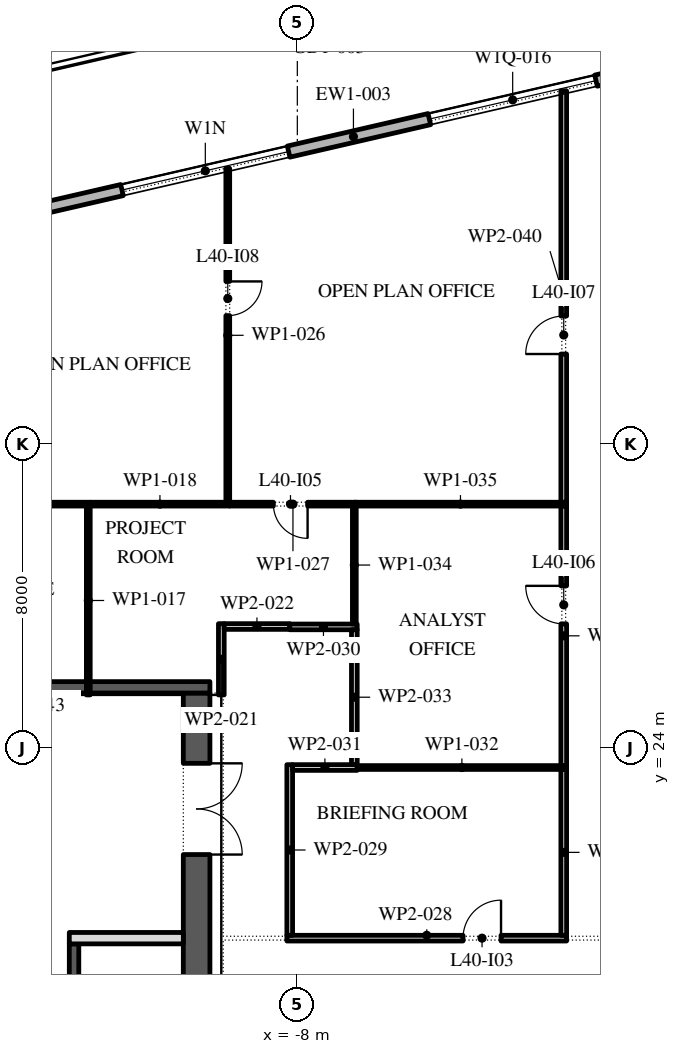
"""IFC4 building model, lengths in metres.
Left out: names, types, materials, properties, quantities, classifications, styles, units other than length and angle.
Written with IfcOpenShell. Run it as: python <this file> out.ifc"""

import sys

from ifc_helpers import new_model, si_unit, direction, frame, frame_2d, origin, place, context, subcontext, project, spatial, rectangle, extrude, element, fill, save


model = new_model("IFC4")
c1 = context("Model", 3, precision=1e-05, world=origin(), true_north=direction((0.0, 1.0)))
c2 = subcontext(c1, "Body", "Model", "MODEL_VIEW")
j1 = project(units=[si_unit("LENGTHUNIT", "METRE"), si_unit("PLANEANGLEUNIT", "RADIAN")], contexts=[c1])
p1 = place(None, origin())
s1 = spatial("IfcSite", under=j1, at=p1, CompositionType="ELEMENT")
p2 = place(p1, origin())
s2 = spatial("IfcBuilding", under=s1, at=p2, CompositionType="ELEMENT")
p3 = place(p2, frame((0.0, 0.0, 184.2)))
s3 = spatial("IfcBuildingStorey", under=s2, at=p3, CompositionType="ELEMENT", Elevation=184.2)
p4 = place(p3, frame((17.592, 45.657, 0.0), z_axis=(0.0, 0.0, 1.0), x_axis=(-0.974370243697, -0.224950279389, 0.0)))
e1 = element("IfcWall", 1, at=p4, inside=s3, PredefinedType="STANDARD", context=c2, shape_type="SweptSolid", body=[
    extrude(rectangle(XDim=49.5, YDim=0.3, at=frame_2d((24.75, 0.0))), origin(), (0.0, 0.0, 1.0), 4.0),
])
p5 = place(p4, frame((2.8, 0.0, 0.0)))
e2 = element("IfcOpeningElement", 2, at=p5, cuts=e1, PredefinedType="OPENING", context=c2, shape_type="SweptSolid", body=[
    extrude(rectangle(XDim=2.4, YDim=3.5, at=frame_2d((1.2, 1.75))), frame((0.0, 0.16, 0.0), z_axis=(0.0, -1.0, 0.0), x_axis=(1.0, 0.0, 0.0)), (0.0, 0.0, 1.0), 0.32),
])
p6 = place(p4, frame((9.9, 0.0, 0.45)))
e3 = element("IfcOpeningElement", 3, at=p6, cuts=e1, PredefinedType="OPENING", context=c2, shape_type="SweptSolid", body=[
    extrude(rectangle(XDim=4.5, YDim=2.45, at=frame_2d((2.25, 1.225))), frame((0.0, 0.16, 0.0), z_axis=(0.0, -1.0, 0.0), x_axis=(1.0, 0.0, 0.0)), (0.0, 0.0, 1.0), 0.32),
])
p7 = place(p4, frame((18.2, 0.0, 0.45)))
e4 = element("IfcOpeningElement", 4, at=p7, cuts=e1, PredefinedType="OPENING", context=c2, shape_type="SweptSolid", body=[
    extrude(rectangle(XDim=4.5, YDim=2.45, at=frame_2d((2.25, 1.225))), frame((0.0, 0.16, 0.0), z_axis=(0.0, -1.0, 0.0), x_axis=(1.0, 0.0, 0.0)), (0.0, 0.0, 1.0), 0.32),
])
p8 = place(p4, frame((26.5, 0.0, 0.45)))
e5 = element("IfcOpeningElement", 5, at=p8, cuts=e1, PredefinedType="OPENING", context=c2, shape_type="SweptSolid", body=[
    extrude(rectangle(XDim=4.5, YDim=2.525, at=frame_2d((2.25, 1.262))), frame((0.0, 0.16, 0.0), z_axis=(0.0, -1.0, 0.0), x_axis=(1.0, 0.0, 0.0)), (0.0, 0.0, 1.0), 0.32),
])
p9 = place(p4, frame((35.85, 0.0, 0.0)))
e6 = element("IfcOpeningElement", 6, at=p9, cuts=e1, PredefinedType="OPENING", context=c2, shape_type="SweptSolid", body=[
    extrude(rectangle(XDim=2.4, YDim=3.5, at=frame_2d((1.2, 1.75))), frame((0.0, 0.16, 0.0), z_axis=(0.0, -1.0, 0.0), x_axis=(1.0, 0.0, 0.0)), (0.0, 0.0, 1.0), 0.32),
])
p10 = place(p4, frame((43.1, 0.0, 0.45)))
e7 = element("IfcOpeningElement", 7, at=p10, cuts=e1, PredefinedType="OPENING", context=c2, shape_type="SweptSolid", body=[
    extrude(rectangle(XDim=4.5, YDim=2.675, at=frame_2d((2.25, 1.337))), frame((0.0, 0.16, 0.0), z_axis=(0.0, -1.0, 0.0), x_axis=(1.0, 0.0, 0.0)), (0.0, 0.0, 1.0), 0.32),
])
p11 = place(p3, frame((-10.65, -2.45, 0.0), z_axis=(0.0, 0.0, 1.0), x_axis=(0.0, 1.0, 0.0)))
e8 = element("IfcWall", 8, at=p11, inside=s3, PredefinedType="SHEAR", context=c2, shape_type="SweptSolid", body=[
    extrude(rectangle(XDim=27.9, YDim=0.7, at=frame_2d((13.95, 0.0))), origin(), (0.0, 0.0, 1.0), 4.0),
])
p12 = place(p11, frame((23.65, 0.0, 0.0)))
e9 = element("IfcOpeningElement", 9, at=p12, cuts=e8, PredefinedType="OPENING", context=c2, shape_type="SweptSolid", body=[
    extrude(rectangle(XDim=2.4, YDim=2.1, at=frame_2d((1.2, 1.05))), frame((0.0, 0.36, 0.0), z_axis=(0.0, -1.0, 0.0), x_axis=(1.0, 0.0, 0.0)), (0.0, 0.0, 1.0), 0.72),
])
p13 = place(p11, frame((0.788, 0.0, 0.0)))
e10 = element("IfcOpeningElement", 10, at=p13, cuts=e8, PredefinedType="OPENING", context=c2, shape_type="SweptSolid", body=[
    extrude(rectangle(XDim=0.9, YDim=2.1, at=frame_2d((0.45, 1.05))), frame((0.0, 0.36, 0.0), z_axis=(0.0, -1.0, 0.0), x_axis=(1.0, 0.0, 0.0)), (0.0, 0.0, 1.0), 0.72),
])
p14 = place(p11, frame((3.962, 0.0, 0.0)))
e11 = element("IfcOpeningElement", 11, at=p14, cuts=e8, PredefinedType="OPENING", context=c2, shape_type="SweptSolid", body=[
    extrude(rectangle(XDim=1.0, YDim=2.1, at=frame_2d((0.5, 1.05))), frame((0.0, 0.36, 0.0), z_axis=(0.0, -1.0, 0.0), x_axis=(1.0, 0.0, 0.0)), (0.0, 0.0, 1.0), 0.72),
])
p15 = place(p3, frame((-21.7, 25.6, 0.0), z_axis=(0.0, 0.0, 1.0), x_axis=(1.0, 0.0, 0.0)))
e12 = element("IfcWall", 12, at=p15, inside=s3, PredefinedType="SHEAR", context=c2, shape_type="SweptSolid", body=[
    extrude(rectangle(XDim=11.4, YDim=0.3, at=frame_2d((5.7, 0.0))), origin(), (0.0, 0.0, 1.0), 4.0),
])
p16 = place(p3, frame((-13.875, -2.45, 0.0), z_axis=(0.0, 0.0, 1.0), x_axis=(0.0, 1.0, 0.0)))
e13 = element("IfcWall", 13, at=p16, inside=s3, PredefinedType="SHEAR", context=c2, shape_type="SweptSolid", body=[
    extrude(rectangle(XDim=21.3, YDim=0.25, at=frame_2d((10.65, 0.0))), origin(), (0.0, 0.0, 1.0), 4.0),
])
p17 = place(p16, frame((17.786, 0.0, 0.0)))
e14 = element("IfcOpeningElement", 14, at=p17, cuts=e13, PredefinedType="OPENING", context=c2, shape_type="SweptSolid", body=[
    extrude(rectangle(XDim=0.9, YDim=2.1, at=frame_2d((0.45, 1.05))), frame((0.0, 0.135, 0.0), z_axis=(0.0, -1.0, 0.0), x_axis=(1.0, 0.0, 0.0)), (0.0, 0.0, 1.0), 0.27),
])
p18 = place(p16, frame((6.971, 0.0, 0.0)))
e15 = element("IfcOpeningElement", 15, at=p18, cuts=e13, PredefinedType="OPENING", context=c2, shape_type="SweptSolid", body=[
    extrude(rectangle(XDim=1.1, YDim=2.1, at=frame_2d((0.55, 1.05))), frame((0.0, 0.135, 0.0), z_axis=(0.0, -1.0, 0.0), x_axis=(1.0, 0.0, 0.0)), (0.0, 0.0, 1.0), 0.27),
])
p19 = place(p16, frame((9.114, 0.0, 0.0)))
e16 = element("IfcOpeningElement", 16, at=p19, cuts=e13, PredefinedType="OPENING", context=c2, shape_type="SweptSolid", body=[
    extrude(rectangle(XDim=1.1, YDim=2.1, at=frame_2d((0.55, 1.05))), frame((0.0, 0.135, 0.0), z_axis=(0.0, -1.0, 0.0), x_axis=(1.0, 0.0, 0.0)), (0.0, 0.0, 1.0), 0.27),
])
p20 = place(p16, frame((11.257, 0.0, 0.0)))
e17 = element("IfcOpeningElement", 17, at=p20, cuts=e13, PredefinedType="OPENING", context=c2, shape_type="SweptSolid", body=[
    extrude(rectangle(XDim=1.1, YDim=2.1, at=frame_2d((0.55, 1.05))), frame((0.0, 0.135, 0.0), z_axis=(0.0, -1.0, 0.0), x_axis=(1.0, 0.0, 0.0)), (0.0, 0.0, 1.0), 0.27),
])
p21 = place(p16, frame((13.4, 0.0, 0.0)))
e18 = element("IfcOpeningElement", 18, at=p21, cuts=e13, PredefinedType="OPENING", context=c2, shape_type="SweptSolid", body=[
    extrude(rectangle(XDim=1.1, YDim=2.1, at=frame_2d((0.55, 1.05))), frame((0.0, 0.135, 0.0), z_axis=(0.0, -1.0, 0.0), x_axis=(1.0, 0.0, 0.0)), (0.0, 0.0, 1.0), 0.27),
])
p22 = place(p3, frame((-14.0, 19.0, 0.0), z_axis=(0.0, 0.0, 1.0), x_axis=(1.0, 0.0, 0.0)))
e19 = element("IfcWall", 19, at=p22, inside=s3, PredefinedType="PARTITIONING", context=c2, shape_type="SweptSolid", body=[
    extrude(rectangle(XDim=3.0, YDim=0.3, at=frame_2d((1.5, 0.0))), origin(), (0.0, 0.0, 1.0), 4.0),
])
p23 = place(p3, frame((-22.47, 30.42, 0.0), z_axis=(0.0, 0.0, 1.0), x_axis=(1.0, 0.0, 0.0)))
e20 = element("IfcWall", 20, at=p23, inside=s3, PredefinedType="PARTITIONING", context=c2, shape_type="SweptSolid", body=[
    extrude(rectangle(XDim=9.02, YDim=0.1, at=frame_2d((4.51, 0.0))), origin(), (0.0, 0.0, 1.0), 4.0),
])
p24 = place(p3, frame((-13.5, 30.37, 0.0), z_axis=(0.0, 0.0, 1.0), x_axis=(0.0, -1.0, 0.0)))
e21 = element("IfcWall", 21, at=p24, inside=s3, PredefinedType="PARTITIONING", context=c2, shape_type="SweptSolid", body=[
    extrude(rectangle(XDim=4.97, YDim=0.1, at=frame_2d((2.485, 0.0))), origin(), (0.0, 0.0, 1.0), 4.0),
])
p25 = place(p3, frame((-13.45, 30.42, 0.0), z_axis=(0.0, 0.0, 1.0), x_axis=(1.0, 0.0, 0.0)))
e22 = element("IfcWall", 22, at=p25, inside=s3, PredefinedType="PARTITIONING", context=c2, shape_type="SweptSolid", body=[
    extrude(rectangle(XDim=3.67, YDim=0.1, at=frame_2d((1.835, 0.0))), origin(), (0.0, 0.0, 1.0), 4.0),
])
p26 = place(p3, frame((-10.0, 25.4, 0.0), z_axis=(0.0, 0.0, 1.0), x_axis=(0.0, 1.0, 0.0)))
e23 = element("IfcWall", 23, at=p26, inside=s3, PredefinedType="PARTITIONING", context=c2, shape_type="SweptSolid", body=[
    extrude(rectangle(XDim=1.875, YDim=0.15, at=frame_2d((0.938, 0.0))), origin(), (0.0, 0.0, 1.0), 4.0),
])
p27 = place(p3, frame((-9.925, 27.2, 0.0), z_axis=(0.0, 0.0, 1.0), x_axis=(1.0, 0.0, 0.0)))
e24 = element("IfcWall", 24, at=p27, inside=s3, PredefinedType="PARTITIONING", context=c2, shape_type="SweptSolid", body=[
    extrude(rectangle(XDim=1.725, YDim=0.15, at=frame_2d((0.863, 0.0))), origin(), (0.0, 0.0, 1.0), 4.0),
])
p28 = place(p3, frame((-9.83, 30.47, 0.0), z_axis=(0.0, 0.0, 1.0), x_axis=(0.0, 1.0, 0.0)))
e25 = element("IfcWall", 25, at=p28, inside=s3, PredefinedType="PARTITIONING", context=c2, shape_type="SweptSolid", body=[
    extrude(rectangle(XDim=8.785, YDim=0.1, at=frame_2d((4.393, 0.0))), origin(), (0.0, 0.0, 1.0), 4.0),
])
p29 = place(p28, frame((4.91, 0.0, 0.0)))
e26 = element("IfcOpeningElement", 26, at=p29, cuts=e25, PredefinedType="OPENING", context=c2, shape_type="SweptSolid", body=[
    extrude(rectangle(XDim=0.9, YDim=2.1, at=frame_2d((0.45, 1.05))), frame((0.0, 0.06, 0.0), z_axis=(0.0, -1.0, 0.0), x_axis=(1.0, 0.0, 0.0)), (0.0, 0.0, 1.0), 0.12),
])
p30 = place(p3, frame((-9.78, 30.42, 0.0), z_axis=(0.0, 0.0, 1.0), x_axis=(1.0, 0.0, 0.0)))
e27 = element("IfcWall", 27, at=p30, inside=s3, PredefinedType="PARTITIONING", context=c2, shape_type="SweptSolid", body=[
    extrude(rectangle(XDim=3.33, YDim=0.1, at=frame_2d((1.665, 0.0))), origin(), (0.0, 0.0, 1.0), 4.0),
])
p31 = place(p30, frame((1.15, 0.0, 0.0)))
e28 = element("IfcOpeningElement", 28, at=p31, cuts=e27, PredefinedType="OPENING", context=c2, shape_type="SweptSolid", body=[
    extrude(rectangle(XDim=0.9, YDim=2.1, at=frame_2d((0.45, 1.05))), frame((0.0, 0.06, 0.0), z_axis=(0.0, -1.0, 0.0), x_axis=(1.0, 0.0, 0.0)), (0.0, 0.0, 1.0), 0.12),
])
p32 = place(p3, frame((-8.275, 19.0, 0.0), z_axis=(0.0, 0.0, 1.0), x_axis=(1.0, 0.0, 0.0)))
e29 = element("IfcWall", 29, at=p32, inside=s3, PredefinedType="PARTITIONING", context=c2, shape_type="SweptSolid", body=[
    extrude(rectangle(XDim=7.36, YDim=0.15, at=frame_2d((3.68, 0.0))), origin(), (0.0, 0.0, 1.0), 4.0),
])
p33 = place(p32, frame((4.635, 0.0, 0.0)))
e30 = element("IfcOpeningElement", 30, at=p33, cuts=e29, PredefinedType="OPENING", context=c2, shape_type="SweptSolid", body=[
    extrude(rectangle(XDim=1.0, YDim=2.1, at=frame_2d((0.5, 1.05))), frame((0.0, 0.085, 0.0), z_axis=(0.0, -1.0, 0.0), x_axis=(1.0, 0.0, 0.0)), (0.0, 0.0, 1.0), 0.17),
])
p34 = place(p3, frame((-8.2, 23.565, 0.0), z_axis=(0.0, 0.0, 1.0), x_axis=(0.0, -1.0, 0.0)))
e31 = element("IfcWall", 31, at=p34, inside=s3, PredefinedType="PARTITIONING", context=c2, shape_type="SweptSolid", body=[
    extrude(rectangle(XDim=4.49, YDim=0.15, at=frame_2d((2.245, 0.0))), origin(), (0.0, 0.0, 1.0), 4.0),
])
p35 = place(p3, frame((-8.2, 27.19, 0.0), z_axis=(0.0, 0.0, 1.0), x_axis=(1.0, 0.0, 0.0)))
e32 = element("IfcWall", 32, at=p35, inside=s3, PredefinedType="PARTITIONING", context=c2, shape_type="SweptSolid", body=[
    extrude(rectangle(XDim=1.775, YDim=0.15, at=frame_2d((0.887, 0.0))), origin(), (0.0, 0.0, 1.0), 4.0),
])
p36 = place(p3, frame((-6.425, 23.49, 0.0), z_axis=(0.0, 0.0, 1.0), x_axis=(-1.0, 0.0, 0.0)))
e33 = element("IfcWall", 33, at=p36, inside=s3, PredefinedType="PARTITIONING", context=c2, shape_type="SweptSolid", body=[
    extrude(rectangle(XDim=1.7, YDim=0.15, at=frame_2d((0.85, 0.0))), origin(), (0.0, 0.0, 1.0), 4.0),
])
p37 = place(p3, frame((-6.425, 23.49, 0.0), z_axis=(0.0, 0.0, 1.0), x_axis=(1.0, 0.0, 0.0)))
e34 = element("IfcWall", 34, at=p37, inside=s3, PredefinedType="PARTITIONING", context=c2, shape_type="SweptSolid", body=[
    extrude(rectangle(XDim=5.51, YDim=0.1, at=frame_2d((2.755, 0.0))), origin(), (0.0, 0.0, 1.0), 4.0),
])
p38 = place(p3, frame((-6.5, 27.115, 0.0), z_axis=(0.0, 0.0, 1.0), x_axis=(0.0, -1.0, 0.0)))
e35 = element("IfcWall", 35, at=p38, inside=s3, PredefinedType="PARTITIONING", context=c2, shape_type="SweptSolid", body=[
    extrude(rectangle(XDim=3.55, YDim=0.15, at=frame_2d((1.775, 0.0))), origin(), (0.0, 0.0, 1.0), 4.0),
])
p39 = place(p3, frame((-6.5, 30.37, 0.0), z_axis=(0.0, 0.0, 1.0), x_axis=(0.0, -1.0, 0.0)))
e36 = element("IfcWall", 36, at=p39, inside=s3, PredefinedType="PARTITIONING", context=c2, shape_type="SweptSolid", body=[
    extrude(rectangle(XDim=3.105, YDim=0.1, at=frame_2d((1.553, 0.0))), origin(), (0.0, 0.0, 1.0), 4.0),
])
p40 = place(p3, frame((-6.5, 30.42, 0.0), z_axis=(0.0, 0.0, 1.0), x_axis=(1.0, 0.0, 0.0)))
e37 = element("IfcWall", 37, at=p40, inside=s3, PredefinedType="PARTITIONING", context=c2, shape_type="SweptSolid", body=[
    extrude(rectangle(XDim=5.585, YDim=0.1, at=frame_2d((2.792, 0.0))), origin(), (0.0, 0.0, 1.0), 4.0),
])
p41 = place(p3, frame((-0.99, 19.075, 0.0), z_axis=(0.0, 0.0, 1.0), x_axis=(0.0, 1.0, 0.0)))
e38 = element("IfcWall", 38, at=p41, inside=s3, PredefinedType="PARTITIONING", context=c2, shape_type="SweptSolid", body=[
    extrude(rectangle(XDim=4.365, YDim=0.15, at=frame_2d((2.183, 0.0))), origin(), (0.0, 0.0, 1.0), 4.0),
])
p42 = place(p3, frame((-0.99, 23.54, 0.0), z_axis=(0.0, 0.0, 1.0), x_axis=(0.0, 1.0, 0.0)))
e39 = element("IfcWall", 39, at=p42, inside=s3, PredefinedType="PARTITIONING", context=c2, shape_type="SweptSolid", body=[
    extrude(rectangle(XDim=6.83, YDim=0.15, at=frame_2d((3.415, 0.0))), origin(), (0.0, 0.0, 1.0), 4.0),
])
p43 = place(p42, frame((3.73, 0.0, 0.0)))
e40 = element("IfcOpeningElement", 40, at=p43, cuts=e39, PredefinedType="OPENING", context=c2, shape_type="SweptSolid", body=[
    extrude(rectangle(XDim=1.0, YDim=2.1, at=frame_2d((0.5, 1.05))), frame((0.0, 0.085, 0.0), z_axis=(0.0, -1.0, 0.0), x_axis=(1.0, 0.0, 0.0)), (0.0, 0.0, 1.0), 0.17),
])
p44 = place(p3, frame((-0.99, 30.47, 0.0), z_axis=(0.0, 0.0, 1.0), x_axis=(0.0, 1.0, 0.0)))
e41 = element("IfcWall", 41, at=p44, inside=s3, PredefinedType="PARTITIONING", context=c2, shape_type="SweptSolid", body=[
    extrude(rectangle(XDim=10.826, YDim=0.15, at=frame_2d((5.413, 0.0))), origin(), (0.0, 0.0, 1.0), 4.0),
])
p45 = place(p44, frame((3.9, 0.0, 0.0)))
e42 = element("IfcOpeningElement", 42, at=p45, cuts=e41, PredefinedType="OPENING", context=c2, shape_type="SweptSolid", body=[
    extrude(rectangle(XDim=1.0, YDim=2.1, at=frame_2d((0.5, 1.05))), frame((0.0, 0.085, 0.0), z_axis=(0.0, -1.0, 0.0), x_axis=(1.0, 0.0, 0.0)), (0.0, 0.0, 1.0), 0.17),
])
p46 = place(p7, origin())
e43 = element("IfcWindow", 43, at=p46, inside=s3, PartitioningType="DOUBLE_PANEL_VERTICAL", PredefinedType="WINDOW", context=c2, shape_type="SweptSolid", body=[
    extrude(rectangle(XDim=4.5, YDim=2.45, at=frame_2d((2.25, 1.225))), frame((0.0, 0.03, 0.0), z_axis=(0.0, -1.0, 0.0), x_axis=(1.0, 0.0, 0.0)), (0.0, 0.0, 1.0), 0.06),
])
fill(e4, e43)
p47 = place(p8, origin())
e44 = element("IfcWindow", 44, at=p47, inside=s3, PartitioningType="DOUBLE_PANEL_VERTICAL", PredefinedType="WINDOW", context=c2, shape_type="SweptSolid", body=[
    extrude(rectangle(XDim=4.5, YDim=2.525, at=frame_2d((2.25, 1.262))), frame((0.0, 0.03, 0.0), z_axis=(0.0, -1.0, 0.0), x_axis=(1.0, 0.0, 0.0)), (0.0, 0.0, 1.0), 0.06),
])
fill(e5, e44)
p48 = place(p12, frame((2.4, 0.0, 0.0), z_axis=(0.0, 0.0, 1.0), x_axis=(-1.0, 0.0, 0.0)))
e45 = element("IfcDoor", 45, at=p48, inside=s3, OperationType="DOUBLE_DOOR_SINGLE_SWING", PredefinedType="DOOR", context=c2, shape_type="SweptSolid", body=[
    extrude(rectangle(XDim=2.4, YDim=2.1, at=frame_2d((1.2, 1.05))), frame((0.0, 0.025, 0.0), z_axis=(0.0, -1.0, 0.0), x_axis=(1.0, 0.0, 0.0)), (0.0, 0.0, 1.0), 0.05),
])
fill(e9, e45)
p49 = place(p33, origin())
e46 = element("IfcDoor", 46, at=p49, inside=s3, OperationType="SINGLE_SWING_LEFT", PredefinedType="DOOR", context=c2, shape_type="SweptSolid", body=[
    extrude(rectangle(XDim=1.0, YDim=2.1, at=frame_2d((0.5, 1.05))), frame((0.0, 0.025, 0.0), z_axis=(0.0, -1.0, 0.0), x_axis=(1.0, 0.0, 0.0)), (0.0, 0.0, 1.0), 0.05),
])
fill(e30, e46)
p50 = place(p31, frame((0.9, 0.0, 0.0), z_axis=(0.0, 0.0, 1.0), x_axis=(-1.0, 0.0, 0.0)))
e47 = element("IfcDoor", 47, at=p50, inside=s3, OperationType="SINGLE_SWING_RIGHT", PredefinedType="DOOR", context=c2, shape_type="SweptSolid", body=[
    extrude(rectangle(XDim=0.9, YDim=2.1, at=frame_2d((0.45, 1.05))), frame((0.0, 0.025, 0.0), z_axis=(0.0, -1.0, 0.0), x_axis=(1.0, 0.0, 0.0)), (0.0, 0.0, 1.0), 0.05),
])
fill(e28, e47)
p51 = place(p43, origin())
e48 = element("IfcDoor", 48, at=p51, inside=s3, OperationType="SINGLE_SWING_LEFT", PredefinedType="DOOR", context=c2, shape_type="SweptSolid", body=[
    extrude(rectangle(XDim=1.0, YDim=2.1, at=frame_2d((0.5, 1.05))), frame((0.0, 0.025, 0.0), z_axis=(0.0, -1.0, 0.0), x_axis=(1.0, 0.0, 0.0)), (0.0, 0.0, 1.0), 0.05),
])
fill(e40, e48)
p52 = place(p45, origin())
e49 = element("IfcDoor", 49, at=p52, inside=s3, OperationType="SINGLE_SWING_RIGHT", PredefinedType="DOOR", context=c2, shape_type="SweptSolid", body=[
    extrude(rectangle(XDim=1.0, YDim=2.1, at=frame_2d((0.5, 1.05))), frame((0.0, 0.025, 0.0), z_axis=(0.0, -1.0, 0.0), x_axis=(1.0, 0.0, 0.0)), (0.0, 0.0, 1.0), 0.05),
])
fill(e42, e49)
p53 = place(p29, frame((0.9, 0.0, 0.0), z_axis=(0.0, 0.0, 1.0), x_axis=(-1.0, 0.0, 0.0)))
e50 = element("IfcDoor", 50, at=p53, inside=s3, OperationType="SINGLE_SWING_RIGHT", PredefinedType="DOOR", context=c2, shape_type="SweptSolid", body=[
    extrude(rectangle(XDim=0.9, YDim=2.1, at=frame_2d((0.45, 1.05))), frame((0.0, 0.025, 0.0), z_axis=(0.0, -1.0, 0.0), x_axis=(1.0, 0.0, 0.0)), (0.0, 0.0, 1.0), 0.05),
])
fill(e26, e50)
save(model, sys.argv[1])
